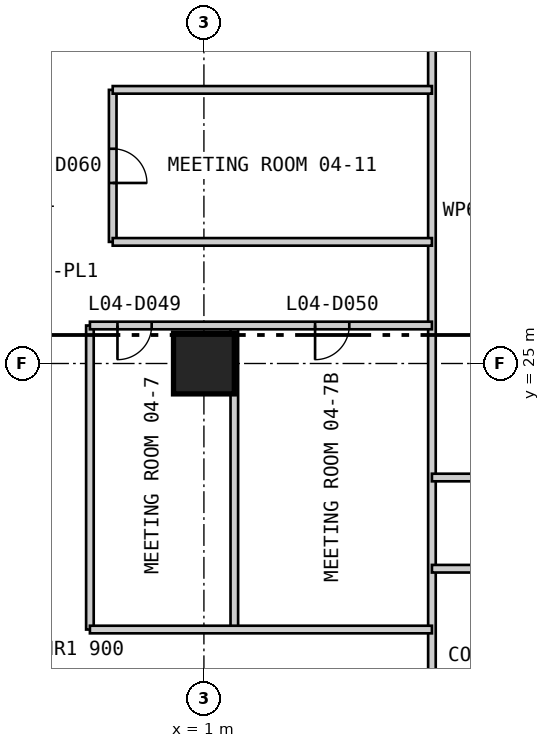
"""IFC4 building model, lengths in metres.
Left out: names, types, materials, properties, quantities, classifications, styles, units other than length and angle.
Written with IfcOpenShell. Run it as: python <this file> out.ifc"""

import sys

from ifc_helpers import new_model, si_unit, direction, frame, frame_2d, origin, origin_2d, place, context, subcontext, project, spatial, rectangle, extrude, element, fill, save


model = new_model("IFC4")
c1 = context("Model", 3, precision=1e-05, world=origin(), true_north=direction((0.0, 1.0)))
c2 = subcontext(c1, "Body", "Model", "MODEL_VIEW")
j1 = project(units=[si_unit("LENGTHUNIT", "METRE"), si_unit("PLANEANGLEUNIT", "RADIAN")], contexts=[c1])
p1 = place(None, origin())
s1 = spatial("IfcSite", under=j1, at=p1, CompositionType="ELEMENT")
p2 = place(p1, origin())
s2 = spatial("IfcBuilding", under=s1, at=p2, CompositionType="ELEMENT")
p3 = place(p2, frame((0.0, 0.0, 21.4)))
s3 = spatial("IfcBuildingStorey", under=s2, at=p3, CompositionType="ELEMENT", Elevation=21.4)
p4 = place(p3, frame((1.0, 25.0, 0.0), z_axis=(0.0, 0.0, 1.0), x_axis=(1.0, 0.0, 0.0)))
e1 = element("IfcColumn", 1, at=p4, inside=s3, PredefinedType="COLUMN", context=c2, shape_type="SweptSolid", body=[
    extrude(rectangle(XDim=1.6, YDim=1.6, at=origin_2d()), origin(), (0.0, 0.0, 1.0), 4.8),
])
p5 = place(p3, frame((-2.0, 18.0, 0.0), z_axis=(0.0, 0.0, 1.0), x_axis=(0.0, 1.0, 0.0)))
e2 = element("IfcWall", 2, at=p5, inside=s3, PredefinedType="PARTITIONING", context=c2, shape_type="SweptSolid", body=[
    extrude(rectangle(XDim=8.0, YDim=0.2, at=frame_2d((4.0, 0.0))), origin(), (0.0, 0.0, 1.0), 4.5),
])
p6 = place(p3, frame((-1.4, 28.2, 0.0), z_axis=(0.0, 0.0, 1.0), x_axis=(0.0, 1.0, 0.0)))
e3 = element("IfcWall", 3, at=p6, inside=s3, PredefinedType="PARTITIONING", context=c2, shape_type="SweptSolid", body=[
    extrude(rectangle(XDim=4.0, YDim=0.2, at=frame_2d((2.0, 0.0))), origin(), (0.0, 0.0, 1.0), 4.5),
])
p7 = place(p6, frame((1.55, 0.0, 0.0)))
e4 = element("IfcOpeningElement", 4, at=p7, cuts=e3, PredefinedType="OPENING", context=c2, shape_type="SweptSolid", body=[
    extrude(rectangle(XDim=0.9, YDim=2.2, at=frame_2d((0.45, 1.1))), frame((0.0, 0.11, 0.0), z_axis=(0.0, -1.0, 0.0), x_axis=(1.0, 0.0, 0.0)), (0.0, 0.0, 1.0), 0.22),
])
p8 = place(p3, frame((1.8, 18.0, 0.0), z_axis=(0.0, 0.0, 1.0), x_axis=(0.0, 1.0, 0.0)))
e5 = element("IfcWall", 5, at=p8, inside=s3, PredefinedType="PARTITIONING", context=c2, shape_type="SweptSolid", body=[
    extrude(rectangle(XDim=8.0, YDim=0.2, at=frame_2d((4.0, 0.0))), origin(), (0.0, 0.0, 1.0), 4.5),
])
p9 = place(p3, frame((7.0, 15.0, 0.0), z_axis=(0.0, 0.0, 1.0), x_axis=(0.0, 1.0, 0.0)))
e6 = element("IfcWall", 6, at=p9, inside=s3, PredefinedType="PARTITIONING", context=c2, shape_type="SweptSolid", body=[
    extrude(rectangle(XDim=28.0, YDim=0.2, at=frame_2d((14.0, 0.0))), origin(), (0.0, 0.0, 1.0), 3.843),
])
p10 = place(p3, frame((-2.0, 18.0, 0.0), z_axis=(0.0, 0.0, 1.0), x_axis=(1.0, 0.0, 0.0)))
e7 = element("IfcWall", 7, at=p10, inside=s3, PredefinedType="PARTITIONING", context=c2, shape_type="SweptSolid", body=[
    extrude(rectangle(XDim=9.0, YDim=0.2, at=frame_2d((4.5, 0.0))), origin(), (0.0, 0.0, 1.0), 4.5),
])
p11 = place(p3, frame((7.0, 19.6, 0.0), z_axis=(0.0, 0.0, 1.0), x_axis=(1.0, 0.0, 0.0)))
e8 = element("IfcWall", 8, at=p11, inside=s3, PredefinedType="PARTITIONING", context=c2, shape_type="SweptSolid", body=[
    extrude(rectangle(XDim=3.6, YDim=0.2, at=frame_2d((1.8, 0.0))), origin(), (0.0, 0.0, 1.0), 4.5),
])
p12 = place(p3, frame((7.0, 22.0, 0.0), z_axis=(0.0, 0.0, 1.0), x_axis=(1.0, 0.0, 0.0)))
e9 = element("IfcWall", 9, at=p12, inside=s3, PredefinedType="PARTITIONING", context=c2, shape_type="SweptSolid", body=[
    extrude(rectangle(XDim=6.0, YDim=0.2, at=frame_2d((3.0, 0.0))), origin(), (0.0, 0.0, 1.0), 4.5),
])
p13 = place(p12, frame((2.1, 0.0, 0.0)))
e10 = element("IfcOpeningElement", 10, at=p13, cuts=e9, PredefinedType="OPENING", context=c2, shape_type="SweptSolid", body=[
    extrude(rectangle(XDim=1.8, YDim=2.4, at=frame_2d((0.9, 1.2))), frame((0.0, 0.11, 0.0), z_axis=(0.0, -1.0, 0.0), x_axis=(1.0, 0.0, 0.0)), (0.0, 0.0, 1.0), 0.22),
])
p14 = place(p3, frame((-2.0, 26.0, 0.0), z_axis=(0.0, 0.0, 1.0), x_axis=(1.0, 0.0, 0.0)))
e11 = element("IfcWall", 11, at=p14, inside=s3, PredefinedType="PARTITIONING", context=c2, shape_type="SweptSolid", body=[
    extrude(rectangle(XDim=9.0, YDim=0.2, at=frame_2d((4.5, 0.0))), origin(), (0.0, 0.0, 1.0), 4.5),
])
p15 = place(p14, frame((0.725, 0.0, 0.0)))
e12 = element("IfcOpeningElement", 12, at=p15, cuts=e11, PredefinedType="OPENING", context=c2, shape_type="SweptSolid", body=[
    extrude(rectangle(XDim=0.9, YDim=2.2, at=frame_2d((0.45, 1.1))), frame((0.0, 0.11, 0.0), z_axis=(0.0, -1.0, 0.0), x_axis=(1.0, 0.0, 0.0)), (0.0, 0.0, 1.0), 0.22),
])
p16 = place(p14, frame((5.925, 0.0, 0.0)))
e13 = element("IfcOpeningElement", 13, at=p16, cuts=e11, PredefinedType="OPENING", context=c2, shape_type="SweptSolid", body=[
    extrude(rectangle(XDim=0.9, YDim=2.2, at=frame_2d((0.45, 1.1))), frame((0.0, 0.11, 0.0), z_axis=(0.0, -1.0, 0.0), x_axis=(1.0, 0.0, 0.0)), (0.0, 0.0, 1.0), 0.22),
])
for number, where, z_axis, x_axis in (
    (14, (-1.4, 28.2, 0.0), (0.0, 0.0, 1.0), (1.0, 0.0, 0.0)),
    (15, (-1.4, 32.2, 0.0), (0.0, 0.0, 1.0), (1.0, 0.0, 0.0)),
):
    element("IfcWall", number, at=place(p3, frame(where, z_axis=z_axis, x_axis=x_axis)), inside=s3, PredefinedType="PARTITIONING", context=c2, shape_type="SweptSolid", body=[
        extrude(rectangle(XDim=8.4, YDim=0.2, at=frame_2d((4.2, 0.0))), origin(), (0.0, 0.0, 1.0), 4.5),
    ])
p17 = place(p15, frame((0.9, 0.0, 0.0), z_axis=(0.0, 0.0, 1.0), x_axis=(-1.0, 0.0, 0.0)))
e16 = element("IfcDoor", 16, at=p17, inside=s3, OperationType="SINGLE_SWING_RIGHT", PredefinedType="DOOR", context=c2, shape_type="SweptSolid", body=[
    extrude(rectangle(XDim=0.9, YDim=2.2, at=frame_2d((0.45, 1.1))), frame((0.0, 0.025, 0.0), z_axis=(0.0, -1.0, 0.0), x_axis=(1.0, 0.0, 0.0)), (0.0, 0.0, 1.0), 0.05),
])
fill(e12, e16)
p18 = place(p16, frame((0.9, 0.0, 0.0), z_axis=(0.0, 0.0, 1.0), x_axis=(-1.0, 0.0, 0.0)))
e17 = element("IfcDoor", 17, at=p18, inside=s3, OperationType="SINGLE_SWING_RIGHT", PredefinedType="DOOR", context=c2, shape_type="SweptSolid", body=[
    extrude(rectangle(XDim=0.9, YDim=2.2, at=frame_2d((0.45, 1.1))), frame((0.0, 0.025, 0.0), z_axis=(0.0, -1.0, 0.0), x_axis=(1.0, 0.0, 0.0)), (0.0, 0.0, 1.0), 0.05),
])
fill(e13, e17)
p19 = place(p7, frame((0.9, 0.0, 0.0), z_axis=(0.0, 0.0, 1.0), x_axis=(-1.0, 0.0, 0.0)))
e18 = element("IfcDoor", 18, at=p19, inside=s3, OperationType="SINGLE_SWING_RIGHT", PredefinedType="DOOR", context=c2, shape_type="SweptSolid", body=[
    extrude(rectangle(XDim=0.9, YDim=2.2, at=frame_2d((0.45, 1.1))), frame((0.0, 0.025, 0.0), z_axis=(0.0, -1.0, 0.0), x_axis=(1.0, 0.0, 0.0)), (0.0, 0.0, 1.0), 0.05),
])
fill(e4, e18)
save(model, sys.argv[1])
